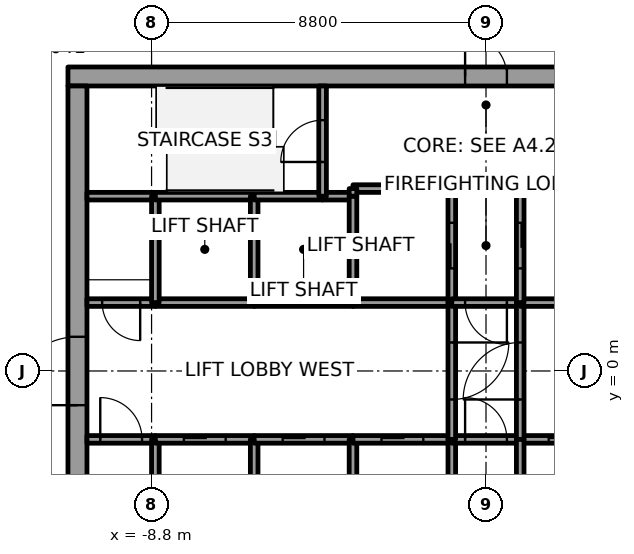
"""IFC4 building model, lengths in metres.
Left out: names, types, materials, properties, quantities, classifications, styles, units other than length and angle.
Written with IfcOpenShell. Run it as: python <this file> out.ifc"""

import sys

from ifc_helpers import new_model, si_unit, direction, frame, frame_2d, origin, place, context, subcontext, project, spatial, rectangle, extrude, element, fill, save


model = new_model("IFC4")
c1 = context("Model", 3, precision=1e-05, world=origin(), true_north=direction((0.0, 1.0)))
c2 = subcontext(c1, "Body", "Model", "MODEL_VIEW")
j1 = project(units=[si_unit("LENGTHUNIT", "METRE"), si_unit("PLANEANGLEUNIT", "RADIAN")], contexts=[c1])
p1 = place(None, origin())
s1 = spatial("IfcSite", under=j1, at=p1, CompositionType="ELEMENT")
p2 = place(p1, origin())
s2 = spatial("IfcBuilding", under=s1, at=p2, CompositionType="ELEMENT")
p3 = place(p2, frame((0.0, 0.0, 92.4)))
s3 = spatial("IfcBuildingStorey", under=s2, at=p3, CompositionType="ELEMENT", Elevation=92.4)
p4 = place(p3, frame((-11.0, 7.75, 0.0), z_axis=(0.0, 0.0, 1.0), x_axis=(1.0, 0.0, 0.0)))
e1 = element("IfcWall", 1, at=p4, inside=s3, PredefinedType="SHEAR", context=c2, shape_type="SweptSolid", body=[
    extrude(rectangle(XDim=22.0, YDim=0.5, at=frame_2d((11.0, 0.0))), origin(), (0.0, 0.0, 1.0), 3.7),
])
p5 = place(p4, frame((10.45, 0.0, 0.0)))
e2 = element("IfcOpeningElement", 2, at=p5, cuts=e1, PredefinedType="OPENING", context=c2, shape_type="SweptSolid", body=[
    extrude(rectangle(XDim=1.1, YDim=2.1, at=frame_2d((0.55, 1.05))), frame((0.0, 0.25, 0.0), z_axis=(0.0, -1.0, 0.0), x_axis=(1.0, 0.0, 0.0)), (0.0, 0.0, 1.0), 0.5),
])
p6 = place(p3, frame((-10.75, -7.5, 0.0), z_axis=(0.0, 0.0, 1.0), x_axis=(0.0, 1.0, 0.0)))
e3 = element("IfcWall", 3, at=p6, inside=s3, PredefinedType="SHEAR", context=c2, shape_type="SweptSolid", body=[
    extrude(rectangle(XDim=15.0, YDim=0.5, at=frame_2d((7.5, 0.0))), origin(), (0.0, 0.0, 1.0), 3.7),
])
p7 = place(p6, frame((6.6, 0.0, 0.0)))
e4 = element("IfcOpeningElement", 4, at=p7, cuts=e3, PredefinedType="OPENING", context=c2, shape_type="SweptSolid", body=[
    extrude(rectangle(XDim=1.8, YDim=2.1, at=frame_2d((0.9, 1.05))), frame((0.0, 0.25, 0.0), z_axis=(0.0, -1.0, 0.0), x_axis=(1.0, 0.0, 0.0)), (0.0, 0.0, 1.0), 0.5),
])
p8 = place(p3, frame((-10.5, -1.8, 0.0), z_axis=(0.0, 0.0, 1.0), x_axis=(1.0, 0.0, 0.0)))
e5 = element("IfcWall", 5, at=p8, inside=s3, PredefinedType="SOLIDWALL", context=c2, shape_type="SweptSolid", body=[
    extrude(rectangle(XDim=1.8, YDim=0.2, at=frame_2d((0.9, 0.0))), origin(), (0.0, 0.0, 1.0), 3.55),
])
p9 = place(p8, frame((0.35, 0.0, 0.0)))
e6 = element("IfcOpeningElement", 6, at=p9, cuts=e5, PredefinedType="OPENING", context=c2, shape_type="SweptSolid", body=[
    extrude(rectangle(XDim=1.1, YDim=2.1, at=frame_2d((0.55, 1.05))), frame((0.0, 0.1, 0.0), z_axis=(0.0, -1.0, 0.0), x_axis=(1.0, 0.0, 0.0)), (0.0, 0.0, 1.0), 0.2),
])
p10 = place(p3, frame((-8.7, 1.8, 0.0), z_axis=(0.0, 0.0, 1.0), x_axis=(-1.0, 0.0, 0.0)))
e7 = element("IfcWall", 7, at=p10, inside=s3, PredefinedType="SOLIDWALL", context=c2, shape_type="SweptSolid", body=[
    extrude(rectangle(XDim=1.8, YDim=0.2, at=frame_2d((0.9, 0.0))), origin(), (0.0, 0.0, 1.0), 3.55),
])
p11 = place(p10, frame((0.4, 0.0, 0.0)))
e8 = element("IfcOpeningElement", 8, at=p11, cuts=e7, PredefinedType="OPENING", context=c2, shape_type="SweptSolid", body=[
    extrude(rectangle(XDim=1.0, YDim=2.1, at=frame_2d((0.5, 1.05))), frame((0.0, 0.1, 0.0), z_axis=(0.0, -1.0, 0.0), x_axis=(1.0, 0.0, 0.0)), (0.0, 0.0, 1.0), 0.2),
])
p12 = place(p3, frame((-8.7, 4.6, 0.0), z_axis=(0.0, 0.0, 1.0), x_axis=(-1.0, 0.0, 0.0)))
e9 = element("IfcWall", 9, at=p12, inside=s3, PredefinedType="SOLIDWALL", context=c2, shape_type="SweptSolid", body=[
    extrude(rectangle(XDim=1.8, YDim=0.2, at=frame_2d((0.9, 0.0))), origin(), (0.0, 0.0, 1.0), 3.55),
])
p13 = place(p3, frame((-8.7, -4.6, 0.0), z_axis=(0.0, 0.0, 1.0), x_axis=(0.0, 1.0, 0.0)))
e10 = element("IfcWall", 10, at=p13, inside=s3, PredefinedType="SOLIDWALL", context=c2, shape_type="SweptSolid", body=[
    extrude(rectangle(XDim=2.8, YDim=0.2, at=frame_2d((1.4, 0.0))), origin(), (0.0, 0.0, 1.0), 3.55),
])
p14 = place(p3, frame((-8.7, -1.8, 0.0), z_axis=(0.0, 0.0, 1.0), x_axis=(1.0, 0.0, 0.0)))
e11 = element("IfcWall", 11, at=p14, inside=s3, PredefinedType="SOLIDWALL", context=c2, shape_type="SweptSolid", body=[
    extrude(rectangle(XDim=2.6, YDim=0.2, at=frame_2d((1.3, 0.0))), origin(), (0.0, 0.0, 1.0), 3.55),
])
p15 = place(p14, frame((0.75, 0.0, 0.0)))
e12 = element("IfcOpeningElement", 12, at=p15, cuts=e11, PredefinedType="OPENING", context=c2, shape_type="SweptSolid", body=[
    extrude(rectangle(XDim=1.1, YDim=2.1, at=frame_2d((0.55, 1.05))), frame((0.0, 0.1, 0.0), z_axis=(0.0, -1.0, 0.0), x_axis=(1.0, 0.0, 0.0)), (0.0, 0.0, 1.0), 0.2),
])
p16 = place(p3, frame((-6.1, 1.8, 0.0), z_axis=(0.0, 0.0, 1.0), x_axis=(-1.0, 0.0, 0.0)))
e13 = element("IfcWall", 13, at=p16, inside=s3, PredefinedType="SOLIDWALL", context=c2, shape_type="SweptSolid", body=[
    extrude(rectangle(XDim=2.6, YDim=0.2, at=frame_2d((1.3, 0.0))), origin(), (0.0, 0.0, 1.0), 3.55),
])
p17 = place(p3, frame((-8.7, 1.8, 0.0), z_axis=(0.0, 0.0, 1.0), x_axis=(0.0, 1.0, 0.0)))
e14 = element("IfcWall", 14, at=p17, inside=s3, PredefinedType="SOLIDWALL", context=c2, shape_type="SweptSolid", body=[
    extrude(rectangle(XDim=2.8, YDim=0.2, at=frame_2d((1.4, 0.0))), origin(), (0.0, 0.0, 1.0), 3.55),
])
p18 = place(p3, frame((-6.1, 4.6, 0.0), z_axis=(0.0, 0.0, 1.0), x_axis=(-1.0, 0.0, 0.0)))
e15 = element("IfcWall", 15, at=p18, inside=s3, PredefinedType="SOLIDWALL", context=c2, shape_type="SweptSolid", body=[
    extrude(rectangle(XDim=2.6, YDim=0.2, at=frame_2d((1.3, 0.0))), origin(), (0.0, 0.0, 1.0), 3.55),
])
p19 = place(p3, frame((-6.1, -4.6, 0.0), z_axis=(0.0, 0.0, 1.0), x_axis=(0.0, 1.0, 0.0)))
e16 = element("IfcWall", 16, at=p19, inside=s3, PredefinedType="SOLIDWALL", context=c2, shape_type="SweptSolid", body=[
    extrude(rectangle(XDim=2.8, YDim=0.2, at=frame_2d((1.4, 0.0))), origin(), (0.0, 0.0, 1.0), 3.55),
])
p20 = place(p3, frame((-6.1, -1.8, 0.0), z_axis=(0.0, 0.0, 1.0), x_axis=(1.0, 0.0, 0.0)))
e17 = element("IfcWall", 17, at=p20, inside=s3, PredefinedType="SOLIDWALL", context=c2, shape_type="SweptSolid", body=[
    extrude(rectangle(XDim=2.6, YDim=0.2, at=frame_2d((1.3, 0.0))), origin(), (0.0, 0.0, 1.0), 3.55),
])
p21 = place(p20, frame((0.75, 0.0, 0.0)))
e18 = element("IfcOpeningElement", 18, at=p21, cuts=e17, PredefinedType="OPENING", context=c2, shape_type="SweptSolid", body=[
    extrude(rectangle(XDim=1.1, YDim=2.1, at=frame_2d((0.55, 1.05))), frame((0.0, 0.1, 0.0), z_axis=(0.0, -1.0, 0.0), x_axis=(1.0, 0.0, 0.0)), (0.0, 0.0, 1.0), 0.2),
])
p22 = place(p3, frame((-3.5, 1.8, 0.0), z_axis=(0.0, 0.0, 1.0), x_axis=(-1.0, 0.0, 0.0)))
e19 = element("IfcWall", 19, at=p22, inside=s3, PredefinedType="SOLIDWALL", context=c2, shape_type="SweptSolid", body=[
    extrude(rectangle(XDim=2.6, YDim=0.2, at=frame_2d((1.3, 0.0))), origin(), (0.0, 0.0, 1.0), 3.55),
])
p23 = place(p3, frame((-6.1, 1.8, 0.0), z_axis=(0.0, 0.0, 1.0), x_axis=(0.0, 1.0, 0.0)))
e20 = element("IfcWall", 20, at=p23, inside=s3, PredefinedType="SOLIDWALL", context=c2, shape_type="SweptSolid", body=[
    extrude(rectangle(XDim=2.8, YDim=0.2, at=frame_2d((1.4, 0.0))), origin(), (0.0, 0.0, 1.0), 3.55),
])
p24 = place(p3, frame((-4.3, 4.6, 0.0), z_axis=(0.0, 0.0, 1.0), x_axis=(-1.0, 0.0, 0.0)))
e21 = element("IfcWall", 21, at=p24, inside=s3, PredefinedType="SOLIDWALL", context=c2, shape_type="SweptSolid", body=[
    extrude(rectangle(XDim=1.8, YDim=0.2, at=frame_2d((0.9, 0.0))), origin(), (0.0, 0.0, 1.0), 3.55),
])
p25 = place(p3, frame((-3.5, 4.6, 0.0), z_axis=(0.0, 0.0, 1.0), x_axis=(-1.0, 0.0, 0.0)))
e22 = element("IfcWall", 22, at=p25, inside=s3, PredefinedType="SOLIDWALL", context=c2, shape_type="SweptSolid", body=[
    extrude(rectangle(XDim=0.8, YDim=0.2, at=frame_2d((0.4, 0.0))), origin(), (0.0, 0.0, 1.0), 3.55),
])
p26 = place(p3, frame((-4.3, 4.6, 0.0), z_axis=(0.0, 0.0, 1.0), x_axis=(0.0, 1.0, 0.0)))
e23 = element("IfcWall", 23, at=p26, inside=s3, PredefinedType="SOLIDWALL", context=c2, shape_type="SweptSolid", body=[
    extrude(rectangle(XDim=2.9, YDim=0.2, at=frame_2d((1.45, 0.0))), origin(), (0.0, 0.0, 1.0), 3.55),
])
p27 = place(p26, frame((0.9, 0.0, 0.0)))
e24 = element("IfcOpeningElement", 24, at=p27, cuts=e23, PredefinedType="OPENING", context=c2, shape_type="SweptSolid", body=[
    extrude(rectangle(XDim=1.1, YDim=2.1, at=frame_2d((0.55, 1.05))), frame((0.0, 0.1, 0.0), z_axis=(0.0, -1.0, 0.0), x_axis=(1.0, 0.0, 0.0)), (0.0, 0.0, 1.0), 0.2),
])
p28 = place(p3, frame((-3.5, -4.6, 0.0), z_axis=(0.0, 0.0, 1.0), x_axis=(0.0, 1.0, 0.0)))
e25 = element("IfcWall", 25, at=p28, inside=s3, PredefinedType="SOLIDWALL", context=c2, shape_type="SweptSolid", body=[
    extrude(rectangle(XDim=2.8, YDim=0.2, at=frame_2d((1.4, 0.0))), origin(), (0.0, 0.0, 1.0), 3.55),
])
p29 = place(p3, frame((-3.5, -1.8, 0.0), z_axis=(0.0, 0.0, 1.0), x_axis=(1.0, 0.0, 0.0)))
e26 = element("IfcWall", 26, at=p29, inside=s3, PredefinedType="SOLIDWALL", context=c2, shape_type="SweptSolid", body=[
    extrude(rectangle(XDim=2.6, YDim=0.2, at=frame_2d((1.3, 0.0))), origin(), (0.0, 0.0, 1.0), 3.55),
])
p30 = place(p29, frame((0.75, 0.0, 0.0)))
e27 = element("IfcOpeningElement", 27, at=p30, cuts=e26, PredefinedType="OPENING", context=c2, shape_type="SweptSolid", body=[
    extrude(rectangle(XDim=1.1, YDim=2.1, at=frame_2d((0.55, 1.05))), frame((0.0, 0.1, 0.0), z_axis=(0.0, -1.0, 0.0), x_axis=(1.0, 0.0, 0.0)), (0.0, 0.0, 1.0), 0.2),
])
p31 = place(p3, frame((-0.9, 1.8, 0.0), z_axis=(0.0, 0.0, 1.0), x_axis=(-1.0, 0.0, 0.0)))
e28 = element("IfcWall", 28, at=p31, inside=s3, PredefinedType="SOLIDWALL", context=c2, shape_type="SweptSolid", body=[
    extrude(rectangle(XDim=2.6, YDim=0.2, at=frame_2d((1.3, 0.0))), origin(), (0.0, 0.0, 1.0), 3.55),
])
p32 = place(p3, frame((-3.5, 4.6, 0.0), z_axis=(0.0, 0.0, 1.0), x_axis=(0.0, -1.0, 0.0)))
e29 = element("IfcWall", 29, at=p32, inside=s3, PredefinedType="SOLIDWALL", context=c2, shape_type="SweptSolid", body=[
    extrude(rectangle(XDim=2.8, YDim=0.2, at=frame_2d((1.4, 0.0))), origin(), (0.0, 0.0, 1.0), 3.55),
])
p33 = place(p3, frame((-0.9, 1.8, 0.0), z_axis=(0.0, 0.0, 1.0), x_axis=(0.0, 1.0, 0.0)))
e30 = element("IfcWall", 30, at=p33, inside=s3, PredefinedType="SOLIDWALL", context=c2, shape_type="SweptSolid", body=[
    extrude(rectangle(XDim=3.0, YDim=0.2, at=frame_2d((1.5, 0.0))), origin(), (0.0, 0.0, 1.0), 3.55),
])
p34 = place(p33, frame((0.9, 0.0, 0.0)))
e31 = element("IfcOpeningElement", 31, at=p34, cuts=e30, PredefinedType="OPENING", context=c2, shape_type="SweptSolid", body=[
    extrude(rectangle(XDim=1.2, YDim=2.1, at=frame_2d((0.6, 1.05))), frame((0.0, 0.1, 0.0), z_axis=(0.0, -1.0, 0.0), x_axis=(1.0, 0.0, 0.0)), (0.0, 0.0, 1.0), 0.2),
])
p35 = place(p3, frame((-0.9, 4.8, 0.0), z_axis=(0.0, 0.0, 1.0), x_axis=(-1.0, 0.0, 0.0)))
e32 = element("IfcWall", 32, at=p35, inside=s3, PredefinedType="SOLIDWALL", context=c2, shape_type="SweptSolid", body=[
    extrude(rectangle(XDim=2.6, YDim=0.2, at=frame_2d((1.3, 0.0))), origin(), (0.0, 0.0, 1.0), 3.55),
])
p36 = place(p3, frame((-3.5, 4.8, 0.0), z_axis=(0.0, 0.0, 1.0), x_axis=(0.0, -1.0, 0.0)))
e33 = element("IfcWall", 33, at=p36, inside=s3, PredefinedType="SOLIDWALL", context=c2, shape_type="SweptSolid", body=[
    extrude(rectangle(XDim=0.2, YDim=0.2, at=frame_2d((0.1, 0.0))), origin(), (0.0, 0.0, 1.0), 3.55),
])
p37 = place(p3, frame((-0.9, -4.6, 0.0), z_axis=(0.0, 0.0, 1.0), x_axis=(0.0, 1.0, 0.0)))
e34 = element("IfcWall", 34, at=p37, inside=s3, PredefinedType="SOLIDWALL", context=c2, shape_type="SweptSolid", body=[
    extrude(rectangle(XDim=2.8, YDim=0.2, at=frame_2d((1.4, 0.0))), origin(), (0.0, 0.0, 1.0), 3.55),
])
p38 = place(p3, frame((-0.9, -1.8, 0.0), z_axis=(0.0, 0.0, 1.0), x_axis=(1.0, 0.0, 0.0)))
e35 = element("IfcWall", 35, at=p38, inside=s3, PredefinedType="SOLIDWALL", context=c2, shape_type="SweptSolid", body=[
    extrude(rectangle(XDim=1.8, YDim=0.2, at=frame_2d((0.9, 0.0))), origin(), (0.0, 0.0, 1.0), 3.55),
])
p39 = place(p38, frame((0.35, 0.0, 0.0)))
e36 = element("IfcOpeningElement", 36, at=p39, cuts=e35, PredefinedType="OPENING", context=c2, shape_type="SweptSolid", body=[
    extrude(rectangle(XDim=1.1, YDim=2.1, at=frame_2d((0.55, 1.05))), frame((0.0, 0.1, 0.0), z_axis=(0.0, -1.0, 0.0), x_axis=(1.0, 0.0, 0.0)), (0.0, 0.0, 1.0), 0.2),
])
p40 = place(p3, frame((-0.9, 1.8, 0.0), z_axis=(0.0, 0.0, 1.0), x_axis=(0.0, -1.0, 0.0)))
e37 = element("IfcWall", 37, at=p40, inside=s3, PredefinedType="SOLIDWALL", context=c2, shape_type="SweptSolid", body=[
    extrude(rectangle(XDim=3.6, YDim=0.2, at=frame_2d((1.8, 0.0))), origin(), (0.0, 0.0, 1.0), 3.55),
])
p41 = place(p40, frame((1.05, 0.0, 0.0)))
e38 = element("IfcOpeningElement", 38, at=p41, cuts=e37, PredefinedType="OPENING", context=c2, shape_type="SweptSolid", body=[
    extrude(rectangle(XDim=1.5, YDim=2.1, at=frame_2d((0.75, 1.05))), frame((0.0, 0.1, 0.0), z_axis=(0.0, -1.0, 0.0), x_axis=(1.0, 0.0, 0.0)), (0.0, 0.0, 1.0), 0.2),
])
p42 = place(p3, frame((0.9, 1.8, 0.0), z_axis=(0.0, 0.0, 1.0), x_axis=(-1.0, 0.0, 0.0)))
e39 = element("IfcWall", 39, at=p42, inside=s3, PredefinedType="SOLIDWALL", context=c2, shape_type="SweptSolid", body=[
    extrude(rectangle(XDim=1.8, YDim=0.2, at=frame_2d((0.9, 0.0))), origin(), (0.0, 0.0, 1.0), 3.55),
])
p43 = place(p42, frame((0.35, 0.0, 0.0)))
e40 = element("IfcOpeningElement", 40, at=p43, cuts=e39, PredefinedType="OPENING", context=c2, shape_type="SweptSolid", body=[
    extrude(rectangle(XDim=1.1, YDim=2.1, at=frame_2d((0.55, 1.05))), frame((0.0, 0.1, 0.0), z_axis=(0.0, -1.0, 0.0), x_axis=(1.0, 0.0, 0.0)), (0.0, 0.0, 1.0), 0.2),
])
p44 = place(p3, frame((0.9, -1.8, 0.0), z_axis=(0.0, 0.0, 1.0), x_axis=(1.0, 0.0, 0.0)))
e41 = element("IfcWall", 41, at=p44, inside=s3, PredefinedType="SOLIDWALL", context=c2, shape_type="SweptSolid", body=[
    extrude(rectangle(XDim=2.6, YDim=0.2, at=frame_2d((1.3, 0.0))), origin(), (0.0, 0.0, 1.0), 3.55),
])
p45 = place(p44, frame((0.75, 0.0, 0.0)))
e42 = element("IfcOpeningElement", 42, at=p45, cuts=e41, PredefinedType="OPENING", context=c2, shape_type="SweptSolid", body=[
    extrude(rectangle(XDim=1.1, YDim=2.1, at=frame_2d((0.55, 1.05))), frame((0.0, 0.1, 0.0), z_axis=(0.0, -1.0, 0.0), x_axis=(1.0, 0.0, 0.0)), (0.0, 0.0, 1.0), 0.2),
])
p46 = place(p3, frame((0.9, -1.8, 0.0), z_axis=(0.0, 0.0, 1.0), x_axis=(0.0, 1.0, 0.0)))
e43 = element("IfcWall", 43, at=p46, inside=s3, PredefinedType="SOLIDWALL", context=c2, shape_type="SweptSolid", body=[
    extrude(rectangle(XDim=3.6, YDim=0.2, at=frame_2d((1.8, 0.0))), origin(), (0.0, 0.0, 1.0), 3.55),
])
p47 = place(p46, frame((1.05, 0.0, 0.0)))
e44 = element("IfcOpeningElement", 44, at=p47, cuts=e43, PredefinedType="OPENING", context=c2, shape_type="SweptSolid", body=[
    extrude(rectangle(XDim=1.5, YDim=2.1, at=frame_2d((0.75, 1.05))), frame((0.0, 0.1, 0.0), z_axis=(0.0, -1.0, 0.0), x_axis=(1.0, 0.0, 0.0)), (0.0, 0.0, 1.0), 0.2),
])
p48 = place(p3, frame((0.9, -1.8, 0.0), z_axis=(0.0, 0.0, 1.0), x_axis=(0.0, -1.0, 0.0)))
e45 = element("IfcWall", 45, at=p48, inside=s3, PredefinedType="SOLIDWALL", context=c2, shape_type="SweptSolid", body=[
    extrude(rectangle(XDim=2.8, YDim=0.2, at=frame_2d((1.4, 0.0))), origin(), (0.0, 0.0, 1.0), 3.55),
])
for number, where, z_axis, x_axis in (
    (46, (3.5, 1.8, 0.0), (0.0, 0.0, 1.0), (-1.0, 0.0, 0.0)),
    (47, (3.5, 4.8, 0.0), (0.0, 0.0, 1.0), (-1.0, 0.0, 0.0)),
):
    element("IfcWall", number, at=place(p3, frame(where, z_axis=z_axis, x_axis=x_axis)), inside=s3, PredefinedType="SOLIDWALL", context=c2, shape_type="SweptSolid", body=[
        extrude(rectangle(XDim=2.6, YDim=0.2, at=frame_2d((1.3, 0.0))), origin(), (0.0, 0.0, 1.0), 3.55),
    ])
p49 = place(p3, frame((0.9, 4.8, 0.0), z_axis=(0.0, 0.0, 1.0), x_axis=(0.0, -1.0, 0.0)))
e48 = element("IfcWall", 48, at=p49, inside=s3, PredefinedType="SOLIDWALL", context=c2, shape_type="SweptSolid", body=[
    extrude(rectangle(XDim=3.0, YDim=0.2, at=frame_2d((1.5, 0.0))), origin(), (0.0, 0.0, 1.0), 3.55),
])
p50 = place(p49, frame((0.9, 0.0, 0.0)))
e49 = element("IfcOpeningElement", 49, at=p50, cuts=e48, PredefinedType="OPENING", context=c2, shape_type="SweptSolid", body=[
    extrude(rectangle(XDim=1.2, YDim=2.1, at=frame_2d((0.6, 1.05))), frame((0.0, 0.1, 0.0), z_axis=(0.0, -1.0, 0.0), x_axis=(1.0, 0.0, 0.0)), (0.0, 0.0, 1.0), 0.2),
])
p51 = place(p15, origin())
e50 = element("IfcDoor", 50, at=p51, inside=s3, OperationType="SLIDING_TO_LEFT", PredefinedType="DOOR", context=c2, shape_type="SweptSolid", body=[
    extrude(rectangle(XDim=1.1, YDim=2.1, at=frame_2d((0.55, 1.05))), frame((0.0, 0.025, 0.0), z_axis=(0.0, -1.0, 0.0), x_axis=(1.0, 0.0, 0.0)), (0.0, 0.0, 1.0), 0.05),
])
fill(e12, e50)
p52 = place(p21, origin())
e51 = element("IfcDoor", 51, at=p52, inside=s3, OperationType="SLIDING_TO_LEFT", PredefinedType="DOOR", context=c2, shape_type="SweptSolid", body=[
    extrude(rectangle(XDim=1.1, YDim=2.1, at=frame_2d((0.55, 1.05))), frame((0.0, 0.025, 0.0), z_axis=(0.0, -1.0, 0.0), x_axis=(1.0, 0.0, 0.0)), (0.0, 0.0, 1.0), 0.05),
])
fill(e18, e51)
p53 = place(p30, origin())
e52 = element("IfcDoor", 52, at=p53, inside=s3, OperationType="SLIDING_TO_LEFT", PredefinedType="DOOR", context=c2, shape_type="SweptSolid", body=[
    extrude(rectangle(XDim=1.1, YDim=2.1, at=frame_2d((0.55, 1.05))), frame((0.0, 0.025, 0.0), z_axis=(0.0, -1.0, 0.0), x_axis=(1.0, 0.0, 0.0)), (0.0, 0.0, 1.0), 0.05),
])
fill(e27, e52)
p54 = place(p45, origin())
e53 = element("IfcDoor", 53, at=p54, inside=s3, OperationType="SLIDING_TO_RIGHT", PredefinedType="DOOR", context=c2, shape_type="SweptSolid", body=[
    extrude(rectangle(XDim=1.1, YDim=2.1, at=frame_2d((0.55, 1.05))), frame((0.0, 0.025, 0.0), z_axis=(0.0, -1.0, 0.0), x_axis=(1.0, 0.0, 0.0)), (0.0, 0.0, 1.0), 0.05),
])
fill(e42, e53)
p55 = place(p34, origin())
e54 = element("IfcDoor", 54, at=p55, inside=s3, OperationType="SLIDING_TO_RIGHT", PredefinedType="DOOR", context=c2, shape_type="SweptSolid", body=[
    extrude(rectangle(XDim=1.2, YDim=2.1, at=frame_2d((0.6, 1.05))), frame((0.0, 0.025, 0.0), z_axis=(0.0, -1.0, 0.0), x_axis=(1.0, 0.0, 0.0)), (0.0, 0.0, 1.0), 0.05),
])
fill(e31, e54)
p56 = place(p50, origin())
e55 = element("IfcDoor", 55, at=p56, inside=s3, OperationType="SLIDING_TO_LEFT", PredefinedType="DOOR", context=c2, shape_type="SweptSolid", body=[
    extrude(rectangle(XDim=1.2, YDim=2.1, at=frame_2d((0.6, 1.05))), frame((0.0, 0.025, 0.0), z_axis=(0.0, -1.0, 0.0), x_axis=(1.0, 0.0, 0.0)), (0.0, 0.0, 1.0), 0.05),
])
fill(e49, e55)
p57 = place(p41, origin())
e56 = element("IfcDoor", 56, at=p57, inside=s3, OperationType="DOUBLE_DOOR_SINGLE_SWING", PredefinedType="DOOR", context=c2, shape_type="SweptSolid", body=[
    extrude(rectangle(XDim=1.5, YDim=2.1, at=frame_2d((0.75, 1.05))), frame((0.0, 0.025, 0.0), z_axis=(0.0, -1.0, 0.0), x_axis=(1.0, 0.0, 0.0)), (0.0, 0.0, 1.0), 0.05),
])
fill(e38, e56)
p58 = place(p47, origin())
e57 = element("IfcDoor", 57, at=p58, inside=s3, OperationType="DOUBLE_DOOR_SINGLE_SWING", PredefinedType="DOOR", context=c2, shape_type="SweptSolid", body=[
    extrude(rectangle(XDim=1.5, YDim=2.1, at=frame_2d((0.75, 1.05))), frame((0.0, 0.025, 0.0), z_axis=(0.0, -1.0, 0.0), x_axis=(1.0, 0.0, 0.0)), (0.0, 0.0, 1.0), 0.05),
])
fill(e44, e57)
p59 = place(p9, origin())
e58 = element("IfcDoor", 58, at=p59, inside=s3, OperationType="SINGLE_SWING_LEFT", PredefinedType="DOOR", context=c2, shape_type="SweptSolid", body=[
    extrude(rectangle(XDim=1.1, YDim=2.1, at=frame_2d((0.55, 1.05))), frame((0.0, 0.025, 0.0), z_axis=(0.0, -1.0, 0.0), x_axis=(1.0, 0.0, 0.0)), (0.0, 0.0, 1.0), 0.05),
])
fill(e6, e58)
p60 = place(p43, origin())
e59 = element("IfcDoor", 59, at=p60, inside=s3, OperationType="SINGLE_SWING_RIGHT", PredefinedType="DOOR", context=c2, shape_type="SweptSolid", body=[
    extrude(rectangle(XDim=1.1, YDim=2.1, at=frame_2d((0.55, 1.05))), frame((0.0, 0.025, 0.0), z_axis=(0.0, -1.0, 0.0), x_axis=(1.0, 0.0, 0.0)), (0.0, 0.0, 1.0), 0.05),
])
fill(e40, e59)
p61 = place(p39, origin())
e60 = element("IfcDoor", 60, at=p61, inside=s3, OperationType="SINGLE_SWING_RIGHT", PredefinedType="DOOR", context=c2, shape_type="SweptSolid", body=[
    extrude(rectangle(XDim=1.1, YDim=2.1, at=frame_2d((0.55, 1.05))), frame((0.0, 0.025, 0.0), z_axis=(0.0, -1.0, 0.0), x_axis=(1.0, 0.0, 0.0)), (0.0, 0.0, 1.0), 0.05),
])
fill(e36, e60)
p62 = place(p11, origin())
e61 = element("IfcDoor", 61, at=p62, inside=s3, OperationType="SINGLE_SWING_RIGHT", PredefinedType="DOOR", context=c2, shape_type="SweptSolid", body=[
    extrude(rectangle(XDim=1.0, YDim=2.1, at=frame_2d((0.5, 1.05))), frame((0.0, 0.025, 0.0), z_axis=(0.0, -1.0, 0.0), x_axis=(1.0, 0.0, 0.0)), (0.0, 0.0, 1.0), 0.05),
])
fill(e8, e61)
p63 = place(p27, origin())
e62 = element("IfcDoor", 62, at=p63, inside=s3, OperationType="SINGLE_SWING_RIGHT", PredefinedType="DOOR", context=c2, shape_type="SweptSolid", body=[
    extrude(rectangle(XDim=1.1, YDim=2.1, at=frame_2d((0.55, 1.05))), frame((0.0, 0.025, 0.0), z_axis=(0.0, -1.0, 0.0), x_axis=(1.0, 0.0, 0.0)), (0.0, 0.0, 1.0), 0.05),
])
fill(e24, e62)
p64 = place(p7, origin())
e63 = element("IfcDoor", 63, at=p64, inside=s3, OperationType="DOUBLE_DOOR_SINGLE_SWING", PredefinedType="DOOR", context=c2, shape_type="SweptSolid", body=[
    extrude(rectangle(XDim=1.8, YDim=2.1, at=frame_2d((0.9, 1.05))), frame((0.0, 0.025, 0.0), z_axis=(0.0, -1.0, 0.0), x_axis=(1.0, 0.0, 0.0)), (0.0, 0.0, 1.0), 0.05),
])
fill(e4, e63)
p65 = place(p5, origin())
e64 = element("IfcDoor", 64, at=p65, inside=s3, OperationType="SINGLE_SWING_LEFT", PredefinedType="DOOR", context=c2, shape_type="SweptSolid", body=[
    extrude(rectangle(XDim=1.1, YDim=2.1, at=frame_2d((0.55, 1.05))), frame((0.0, 0.025, 0.0), z_axis=(0.0, -1.0, 0.0), x_axis=(1.0, 0.0, 0.0)), (0.0, 0.0, 1.0), 0.05),
])
fill(e2, e64)
save(model, sys.argv[1])
